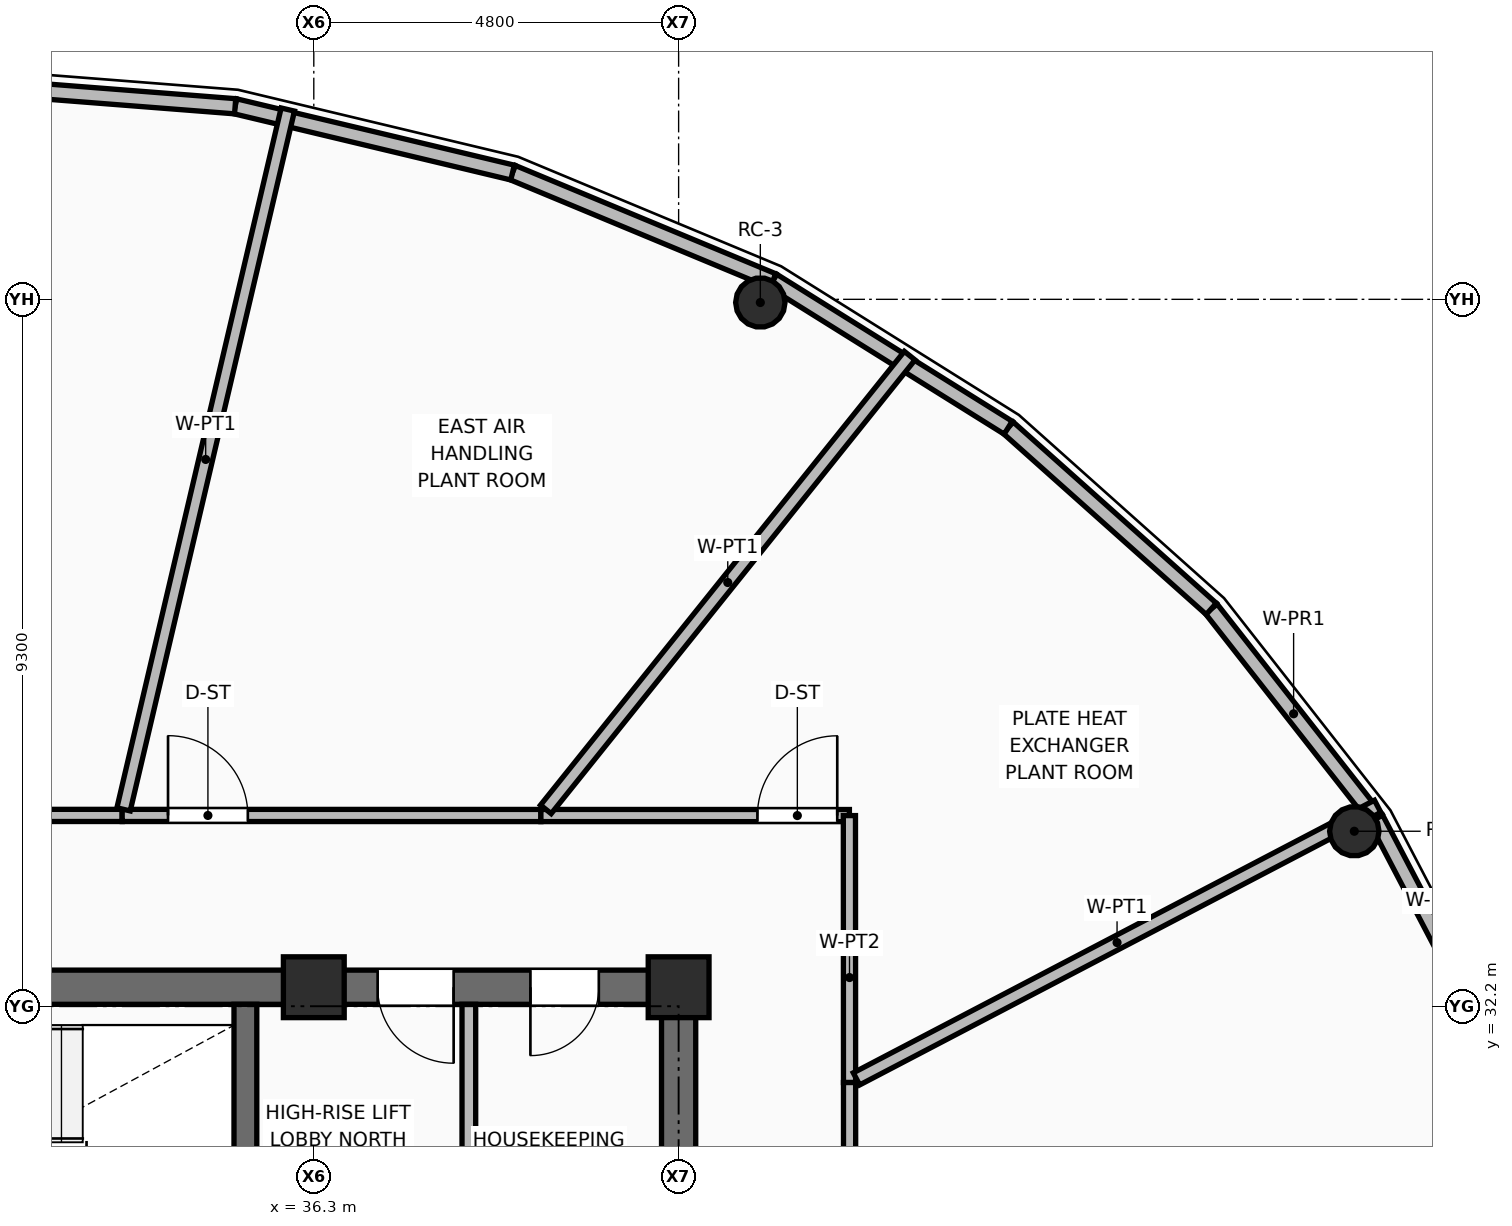
"""IFC4 building model, lengths in metres.
Left out: names, types, materials, properties, quantities, classifications, styles, units other than length and angle.
Written with IfcOpenShell. Run it as: python <this file> out.ifc"""

import sys

from ifc_helpers import new_model, si_unit, direction, frame, frame_2d, origin, origin_2d, place, context, subcontext, project, spatial, rectangle, hollow_circle, extrude, element, fill, save


model = new_model("IFC4")
c1 = context("Model", 3, precision=1e-05, world=origin(), true_north=direction((0.0, 1.0)))
c2 = subcontext(c1, "Body", "Model", "MODEL_VIEW")
j1 = project(units=[si_unit("LENGTHUNIT", "METRE"), si_unit("PLANEANGLEUNIT", "RADIAN")], contexts=[c1])
p1 = place(None, origin())
s1 = spatial("IfcSite", under=j1, at=p1, CompositionType="ELEMENT")
p2 = place(p1, origin())
s2 = spatial("IfcBuilding", under=s1, at=p2, CompositionType="ELEMENT")
p3 = place(p2, frame((0.0, 0.0, 253.65)))
s3 = spatial("IfcBuildingStorey", under=s2, at=p3, CompositionType="ELEMENT", Elevation=253.65)
for number, where, z_axis, x_axis in (
    (1, (36.3, 32.45, 0.0), (0.0, 0.0, 1.0), (1.0, 0.0, 0.0)),
    (2, (41.1, 32.45, 0.0), (0.0, 0.0, 1.0), (1.0, 0.0, 0.0)),
):
    element("IfcColumn", number, at=place(p3, frame(where, z_axis=z_axis, x_axis=x_axis)), inside=s3, PredefinedType="COLUMN", context=c2, shape_type="SweptSolid", body=[
        extrude(rectangle(XDim=0.8, YDim=0.8, at=origin_2d()), origin(), (0.0, 0.0, 1.0), 5.4),
    ])
p4 = place(p3, frame((49.99, 34.502, 0.0), z_axis=(-0.224793032222, -0.115835378923, 0.967496903175), x_axis=(0.458059425605, -0.888921572814, 0.0)))
e3 = element("IfcColumn", 3, at=p4, inside=s3, PredefinedType="COLUMN", context=c2, shape_type="SweptSolid", body=[
    extrude(hollow_circle(Radius=0.325, WallThickness=0.03, at=origin_2d()), origin(), (0.0, 0.0, 1.0), 5.396),
])
p5 = place(p3, frame((42.175, 41.458, 0.0), z_axis=(-0.130171994019, -0.201410172818, 0.970818826691), x_axis=(0.839859571413, -0.542803740136, 0.0)))
e4 = element("IfcColumn", 4, at=p5, inside=s3, PredefinedType="COLUMN", context=c2, shape_type="SweptSolid", body=[
    extrude(hollow_circle(Radius=0.325, WallThickness=0.03, at=origin_2d()), origin(), (0.0, 0.0, 1.0), 5.377),
])
p6 = place(p3, frame((51.873, 31.613, 0.0), z_axis=(0.0, 0.0, 1.0), x_axis=(-0.463654949237, 0.886015850901, 0.0)))
e5 = element("IfcWall", 5, at=p6, inside=s3, PredefinedType="PARAPET", context=c2, shape_type="SweptSolid", body=[
    extrude(rectangle(XDim=3.447, YDim=0.2, at=frame_2d((1.723, 0.0))), origin(), (0.0, 0.0, 1.0), 1.12),
])
p7 = place(p3, frame((50.275, 34.667, 0.0), z_axis=(0.0, 0.0, 1.0), x_axis=(-0.617406744437, 0.786644082113, 0.0)))
e6 = element("IfcWall", 6, at=p7, inside=s3, PredefinedType="PARAPET", context=c2, shape_type="SweptSolid", body=[
    extrude(rectangle(XDim=3.51, YDim=0.2, at=frame_2d((1.755, 0.0))), origin(), (0.0, 0.0, 1.0), 1.12),
])
p8 = place(p3, frame((48.108, 37.428, 0.0), z_axis=(0.0, 0.0, 1.0), x_axis=(-0.74629085689, 0.665619979359, 0.0)))
e7 = element("IfcWall", 7, at=p8, inside=s3, PredefinedType="PARAPET", context=c2, shape_type="SweptSolid", body=[
    extrude(rectangle(XDim=3.58, YDim=0.2, at=frame_2d((1.79, 0.0))), origin(), (0.0, 0.0, 1.0), 1.12),
])
p9 = place(p3, frame((45.436, 39.811, 0.0), z_axis=(0.0, 0.0, 1.0), x_axis=(-0.84825750298, 0.529583995828, 0.0)))
e8 = element("IfcWall", 8, at=p9, inside=s3, PredefinedType="PARAPET", context=c2, shape_type="SweptSolid", body=[
    extrude(rectangle(XDim=3.65, YDim=0.2, at=frame_2d((1.825, 0.0))), origin(), (0.0, 0.0, 1.0), 1.12),
])
p10 = place(p3, frame((42.34, 41.744, 0.0), z_axis=(0.0, 0.0, 1.0), x_axis=(-0.92336680677, 0.383918923935, 0.0)))
e9 = element("IfcWall", 9, at=p10, inside=s3, PredefinedType="PARAPET", context=c2, shape_type="SweptSolid", body=[
    extrude(rectangle(XDim=3.709, YDim=0.2, at=frame_2d((1.854, 0.0))), origin(), (0.0, 0.0, 1.0), 1.12),
])
p11 = place(p3, frame((38.915, 43.168, 0.0), z_axis=(0.0, 0.0, 1.0), x_axis=(-0.972626535049, 0.23237388691, 0.0)))
e10 = element("IfcWall", 10, at=p11, inside=s3, PredefinedType="PARAPET", context=c2, shape_type="SweptSolid", body=[
    extrude(rectangle(XDim=3.753, YDim=0.2, at=frame_2d((1.876, 0.0))), origin(), (0.0, 0.0, 1.0), 1.12),
])
p12 = place(p3, frame((35.265, 44.04, 0.0), z_axis=(0.0, 0.0, 1.0), x_axis=(-0.996965983674, 0.077838469901, 0.0)))
e11 = element("IfcWall", 11, at=p12, inside=s3, PredefinedType="PARAPET", context=c2, shape_type="SweptSolid", body=[
    extrude(rectangle(XDim=3.776, YDim=0.2, at=frame_2d((1.888, 0.0))), origin(), (0.0, 0.0, 1.0), 1.12),
])
p13 = place(p3, frame((21.675, 32.45, 0.0), z_axis=(0.0, 0.0, 1.0), x_axis=(1.0, 0.0, 0.0)))
e12 = element("IfcWall", 12, at=p13, inside=s3, PredefinedType="SHEAR", context=c2, shape_type="SweptSolid", body=[
    extrude(rectangle(XDim=19.65, YDim=0.45, at=frame_2d((9.825, 0.0))), origin(), (0.0, 0.0, 1.0), 5.22),
])
p14 = place(p13, frame((2.075, 0.0, 0.0)))
e13 = element("IfcOpeningElement", 13, at=p14, cuts=e12, PredefinedType="OPENING", context=c2, shape_type="SweptSolid", body=[
    extrude(rectangle(XDim=1.1, YDim=2.1, at=frame_2d((0.55, 1.05))), frame((0.0, 0.235, 0.0), z_axis=(0.0, -1.0, 0.0), x_axis=(1.0, 0.0, 0.0)), (0.0, 0.0, 1.0), 0.47),
])
p15 = place(p13, frame((15.465, 0.0, 0.0)))
e14 = element("IfcOpeningElement", 14, at=p15, cuts=e12, PredefinedType="OPENING", context=c2, shape_type="SweptSolid", body=[
    extrude(rectangle(XDim=1.0, YDim=2.1, at=frame_2d((0.5, 1.05))), frame((0.0, 0.235, 0.0), z_axis=(0.0, -1.0, 0.0), x_axis=(1.0, 0.0, 0.0)), (0.0, 0.0, 1.0), 0.47),
])
p16 = place(p13, frame((17.475, 0.0, 0.0)))
e15 = element("IfcOpeningElement", 15, at=p16, cuts=e12, PredefinedType="OPENING", context=c2, shape_type="SweptSolid", body=[
    extrude(rectangle(XDim=0.9, YDim=2.1, at=frame_2d((0.45, 1.05))), frame((0.0, 0.235, 0.0), z_axis=(0.0, -1.0, 0.0), x_axis=(1.0, 0.0, 0.0)), (0.0, 0.0, 1.0), 0.47),
])
p17 = place(p3, frame((41.1, 18.025, 0.0), z_axis=(0.0, 0.0, 1.0), x_axis=(0.0, 1.0, 0.0)))
e16 = element("IfcWall", 16, at=p17, inside=s3, PredefinedType="SHEAR", context=c2, shape_type="SweptSolid", body=[
    extrude(rectangle(XDim=14.2, YDim=0.45, at=frame_2d((7.1, 0.0))), origin(), (0.0, 0.0, 1.0), 5.22),
])
p18 = place(p17, frame((3.435, 0.0, 0.0)))
e17 = element("IfcOpeningElement", 17, at=p18, cuts=e16, PredefinedType="OPENING", context=c2, shape_type="SweptSolid", body=[
    extrude(rectangle(XDim=1.05, YDim=2.1, at=frame_2d((0.525, 1.05))), frame((0.0, 0.235, 0.0), z_axis=(0.0, -1.0, 0.0), x_axis=(1.0, 0.0, 0.0)), (0.0, 0.0, 1.0), 0.47),
])
p19 = place(p3, frame((35.4, 28.75, 0.0), z_axis=(0.0, 0.0, 1.0), x_axis=(0.0, 1.0, 0.0)))
e18 = element("IfcWall", 18, at=p19, inside=s3, PredefinedType="SHEAR", context=c2, shape_type="SweptSolid", body=[
    extrude(rectangle(XDim=3.475, YDim=0.3, at=frame_2d((1.738, 0.0))), origin(), (0.0, 0.0, 1.0), 5.22),
])
p20 = place(p3, frame((38.34, 28.62, 0.0), z_axis=(0.0, 0.0, 1.0), x_axis=(0.0, 1.0, 0.0)))
e19 = element("IfcWall", 19, at=p20, inside=s3, PredefinedType="PARTITIONING", context=c2, shape_type="SweptSolid", body=[
    extrude(rectangle(XDim=3.605, YDim=0.18, at=frame_2d((1.802, 0.0))), origin(), (0.0, 0.0, 1.0), 5.2),
])
p21 = place(p3, frame((28.827, 34.711, 0.0), z_axis=(0.0, 0.0, 1.0), x_axis=(0.999999980556, -0.00019719976, 0.0)))
e20 = element("IfcWall", 20, at=p21, inside=s3, PredefinedType="PARTITIONING", context=c2, shape_type="SweptSolid", body=[
    extrude(rectangle(XDim=4.952, YDim=0.16, at=frame_2d((2.476, 0.0))), origin(), (0.0, 0.0, 1.0), 4.733),
])
p22 = place(p21, frame((1.951, 0.0, 0.0)))
e21 = element("IfcOpeningElement", 21, at=p22, cuts=e20, PredefinedType="OPENING", context=c2, shape_type="SweptSolid", body=[
    extrude(rectangle(XDim=1.05, YDim=2.1, at=frame_2d((0.525, 1.05))), frame((0.0, 0.09, 0.0), z_axis=(0.0, -1.0, 0.0), x_axis=(1.0, 0.0, 0.0)), (0.0, 0.0, 1.0), 0.18),
])
p23 = place(p3, frame((33.779, 34.71, 0.0), z_axis=(0.0, 0.0, 1.0), x_axis=(0.999999984288, -0.000177265674, 0.0)))
e22 = element("IfcWall", 22, at=p23, inside=s3, PredefinedType="PARTITIONING", context=c2, shape_type="SweptSolid", body=[
    extrude(rectangle(XDim=5.509, YDim=0.16, at=frame_2d((2.754, 0.0))), origin(), (0.0, 0.0, 1.0), 5.2),
])
p24 = place(p23, frame((0.603, 0.0, 0.0)))
e23 = element("IfcOpeningElement", 23, at=p24, cuts=e22, PredefinedType="OPENING", context=c2, shape_type="SweptSolid", body=[
    extrude(rectangle(XDim=1.05, YDim=2.1, at=frame_2d((0.525, 1.05))), frame((0.0, 0.09, 0.0), z_axis=(0.0, -1.0, 0.0), x_axis=(1.0, 0.0, 0.0)), (0.0, 0.0, 1.0), 0.18),
])
p25 = place(p3, frame((39.288, 34.709, 0.0), z_axis=(0.0, 0.0, 1.0), x_axis=(0.999999971055, -0.000240601497, 0.0)))
e24 = element("IfcWall", 24, at=p25, inside=s3, PredefinedType="PARTITIONING", context=c2, shape_type="SweptSolid", body=[
    extrude(rectangle(XDim=4.059, YDim=0.16, at=frame_2d((2.029, 0.0))), origin(), (0.0, 0.0, 1.0), 4.733),
])
p26 = place(p25, frame((2.849, 0.0, 0.0)))
e25 = element("IfcOpeningElement", 25, at=p26, cuts=e24, PredefinedType="OPENING", context=c2, shape_type="SweptSolid", body=[
    extrude(rectangle(XDim=1.05, YDim=2.1, at=frame_2d((0.525, 1.05))), frame((0.0, 0.09, 0.0), z_axis=(0.0, -1.0, 0.0), x_axis=(1.0, 0.0, 0.0)), (0.0, 0.0, 1.0), 0.18),
])
p27 = place(p3, frame((43.347, 34.708, 0.0), z_axis=(0.0, 0.0, 1.0), x_axis=(0.000625651598, -0.99999980428, 0.0)))
e26 = element("IfcWall", 26, at=p27, inside=s3, PredefinedType="PARTITIONING", context=c2, shape_type="SweptSolid", body=[
    extrude(rectangle(XDim=3.512, YDim=0.16, at=frame_2d((1.756, 0.0))), origin(), (0.0, 0.0, 1.0), 4.733),
])
p28 = place(p3, frame((43.349, 31.196, 0.0), z_axis=(0.0, 0.0, 1.0), x_axis=(0.000458908514, -0.999999894701, 0.0)))
e27 = element("IfcWall", 27, at=p28, inside=s3, PredefinedType="PARTITIONING", context=c2, shape_type="SweptSolid", body=[
    extrude(rectangle(XDim=6.384, YDim=0.16, at=frame_2d((3.192, 0.0))), origin(), (0.0, 0.0, 1.0), 5.2),
])
p29 = place(p28, frame((3.404, 0.0, 0.0)))
e28 = element("IfcOpeningElement", 28, at=p29, cuts=e27, PredefinedType="OPENING", context=c2, shape_type="SweptSolid", body=[
    extrude(rectangle(XDim=1.05, YDim=2.1, at=frame_2d((0.525, 1.05))), frame((0.0, 0.09, 0.0), z_axis=(0.0, -1.0, 0.0), x_axis=(1.0, 0.0, 0.0)), (0.0, 0.0, 1.0), 0.18),
])
p30 = place(p3, frame((43.44, 31.244, 0.0), z_axis=(0.0, 0.0, 1.0), x_axis=(0.886132697357, 0.463431594385, 0.0)))
e29 = element("IfcWall", 29, at=p30, inside=s3, PredefinedType="PARTITIONING", context=c2, shape_type="SweptSolid", body=[
    extrude(rectangle(XDim=7.738, YDim=0.18, at=frame_2d((3.869, 0.0))), origin(), (0.0, 0.0, 1.0), 4.575),
])
p31 = place(p3, frame((39.353, 34.79, 0.0), z_axis=(0.0, 0.0, 1.0), x_axis=(0.62562461259, 0.780124249156, 0.0)))
e30 = element("IfcWall", 30, at=p31, inside=s3, PredefinedType="PARTITIONING", context=c2, shape_type="SweptSolid", body=[
    extrude(rectangle(XDim=7.651, YDim=0.18, at=frame_2d((3.826, 0.0))), origin(), (0.0, 0.0, 1.0), 4.575),
])
p32 = place(p3, frame((33.797, 34.79, 0.0), z_axis=(0.0, 0.0, 1.0), x_axis=(0.22849108233, 0.973546005742, 0.0)))
e31 = element("IfcWall", 31, at=p32, inside=s3, PredefinedType="PARTITIONING", context=c2, shape_type="SweptSolid", body=[
    extrude(rectangle(XDim=9.457, YDim=0.18, at=frame_2d((4.729, 0.0))), origin(), (0.0, 0.0, 1.0), 4.575),
])
p33 = place(p15, frame((1.0, 0.0, 0.0), z_axis=(0.0, 0.0, 1.0), x_axis=(-1.0, 0.0, 0.0)))
e32 = element("IfcDoor", 32, at=p33, inside=s3, OperationType="SINGLE_SWING_LEFT", PredefinedType="DOOR", context=c2, shape_type="SweptSolid", body=[
    extrude(rectangle(XDim=1.0, YDim=2.1, at=frame_2d((0.5, 1.05))), frame((0.0, 0.025, 0.0), z_axis=(0.0, -1.0, 0.0), x_axis=(1.0, 0.0, 0.0)), (0.0, 0.0, 1.0), 0.05),
])
fill(e14, e32)
p34 = place(p16, frame((0.9, 0.0, 0.0), z_axis=(0.0, 0.0, 1.0), x_axis=(-1.0, 0.0, 0.0)))
e33 = element("IfcDoor", 33, at=p34, inside=s3, OperationType="SINGLE_SWING_RIGHT", PredefinedType="DOOR", context=c2, shape_type="SweptSolid", body=[
    extrude(rectangle(XDim=0.9, YDim=2.1, at=frame_2d((0.45, 1.05))), frame((0.0, 0.025, 0.0), z_axis=(0.0, -1.0, 0.0), x_axis=(1.0, 0.0, 0.0)), (0.0, 0.0, 1.0), 0.05),
])
fill(e15, e33)
p35 = place(p26, origin())
e34 = element("IfcDoor", 34, at=p35, inside=s3, OperationType="SINGLE_SWING_RIGHT", PredefinedType="DOOR", context=c2, shape_type="SweptSolid", body=[
    extrude(rectangle(XDim=1.05, YDim=2.1, at=frame_2d((0.525, 1.05))), frame((0.0, 0.025, 0.0), z_axis=(0.0, -1.0, 0.0), x_axis=(1.0, 0.0, 0.0)), (0.0, 0.0, 1.0), 0.05),
])
fill(e25, e34)
p36 = place(p24, origin())
e35 = element("IfcDoor", 35, at=p36, inside=s3, OperationType="SINGLE_SWING_LEFT", PredefinedType="DOOR", context=c2, shape_type="SweptSolid", body=[
    extrude(rectangle(XDim=1.05, YDim=2.1, at=frame_2d((0.525, 1.05))), frame((0.0, 0.025, 0.0), z_axis=(0.0, -1.0, 0.0), x_axis=(1.0, 0.0, 0.0)), (0.0, 0.0, 1.0), 0.05),
])
fill(e23, e35)
save(model, sys.argv[1])
